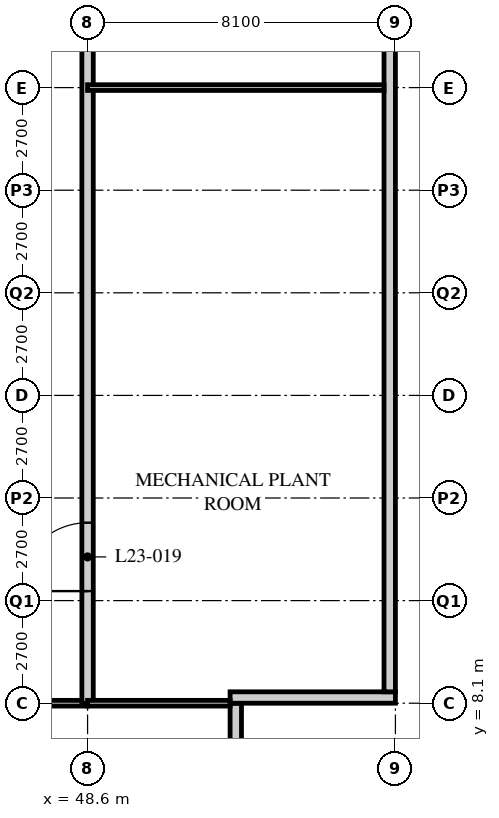
"""IFC4 building model, lengths in metres.
Left out: names, types, materials, properties, quantities, classifications, styles, units other than length and angle.
Written with IfcOpenShell. Run it as: python <this file> out.ifc"""

import sys

from ifc_helpers import new_model, si_unit, direction, frame, frame_2d, origin, place, context, subcontext, project, spatial, rectangle, extrude, element, fill, save


model = new_model("IFC4")
c1 = context("Model", 3, precision=1e-05, world=origin(), true_north=direction((0.0, 1.0)))
c2 = subcontext(c1, "Body", "Model", "MODEL_VIEW")
j1 = project(units=[si_unit("LENGTHUNIT", "METRE"), si_unit("PLANEANGLEUNIT", "RADIAN")], contexts=[c1])
p1 = place(None, origin())
s1 = spatial("IfcSite", under=j1, at=p1, CompositionType="ELEMENT")
p2 = place(p1, origin())
s2 = spatial("IfcBuilding", under=s1, at=p2, CompositionType="ELEMENT")
p3 = place(p2, frame((0.0, 0.0, 90.8)))
s3 = spatial("IfcBuildingStorey", under=s2, at=p3, CompositionType="ELEMENT", Elevation=90.8)
p4 = place(p3, frame((52.5, 4.35, 0.0), z_axis=(0.0, 0.0, 1.0), x_axis=(0.0, 1.0, 0.0)))
e1 = element("IfcWall", 1, at=p4, inside=s3, PredefinedType="SOLIDWALL", context=c2, shape_type="SweptSolid", body=[
    extrude(rectangle(XDim=3.75, YDim=0.3, at=frame_2d((1.875, 0.0))), origin(), (0.0, 0.0, 1.0), 6.25),
])
p5 = place(p3, frame((52.35, 8.25, 0.0), z_axis=(0.0, 0.0, 1.0), x_axis=(1.0, 0.0, 0.0)))
e2 = element("IfcWall", 2, at=p5, inside=s3, PredefinedType="SOLIDWALL", context=c2, shape_type="SweptSolid", body=[
    extrude(rectangle(XDim=4.35, YDim=0.3, at=frame_2d((2.175, 0.0))), origin(), (0.0, 0.0, 1.0), 6.95),
])
p6 = place(p3, frame((56.55, 8.4, 0.0), z_axis=(0.0, 0.0, 1.0), x_axis=(0.0, 1.0, 0.0)))
e3 = element("IfcWall", 3, at=p6, inside=s3, PredefinedType="SOLIDWALL", context=c2, shape_type="SweptSolid", body=[
    extrude(rectangle(XDim=32.1, YDim=0.3, at=frame_2d((16.05, 0.0))), origin(), (0.0, 0.0, 1.0), 5.85),
])
p7 = place(p3, frame((8.1, 8.1, 0.0), z_axis=(0.0, 0.0, 1.0), x_axis=(1.0, 0.0, 0.0)))
e4 = element("IfcWall", 4, at=p7, inside=s3, PredefinedType="PARTITIONING", context=c2, shape_type="SweptSolid", body=[
    extrude(rectangle(XDim=40.5, YDim=0.15, at=frame_2d((20.25, 0.0))), origin(), (0.0, 0.0, 1.0), 6.95),
])
p8 = place(p7, frame((11.25, 0.0, 0.0)))
e5 = element("IfcOpeningElement", 5, at=p8, cuts=e4, PredefinedType="OPENING", context=c2, shape_type="SweptSolid", body=[
    extrude(rectangle(XDim=1.8, YDim=2.4, at=frame_2d((0.9, 1.2))), frame((0.0, 0.085, 0.0), z_axis=(0.0, -1.0, 0.0), x_axis=(1.0, 0.0, 0.0)), (0.0, 0.0, 1.0), 0.17),
])
p9 = place(p7, frame((27.45, 0.0, 0.0)))
e6 = element("IfcOpeningElement", 6, at=p9, cuts=e4, PredefinedType="OPENING", context=c2, shape_type="SweptSolid", body=[
    extrude(rectangle(XDim=1.8, YDim=2.4, at=frame_2d((0.9, 1.2))), frame((0.0, 0.085, 0.0), z_axis=(0.0, -1.0, 0.0), x_axis=(1.0, 0.0, 0.0)), (0.0, 0.0, 1.0), 0.17),
])
p10 = place(p7, frame((1.525, 0.0, 0.0)))
e7 = element("IfcOpeningElement", 7, at=p10, cuts=e4, PredefinedType="OPENING", context=c2, shape_type="SweptSolid", body=[
    extrude(rectangle(XDim=1.0, YDim=2.1, at=frame_2d((0.5, 1.05))), frame((0.0, 0.085, 0.0), z_axis=(0.0, -1.0, 0.0), x_axis=(1.0, 0.0, 0.0)), (0.0, 0.0, 1.0), 0.17),
])
p11 = place(p7, frame((37.975, 0.0, 0.0)))
e8 = element("IfcOpeningElement", 8, at=p11, cuts=e4, PredefinedType="OPENING", context=c2, shape_type="SweptSolid", body=[
    extrude(rectangle(XDim=1.0, YDim=2.1, at=frame_2d((0.5, 1.05))), frame((0.0, 0.085, 0.0), z_axis=(0.0, -1.0, 0.0), x_axis=(1.0, 0.0, 0.0)), (0.0, 0.0, 1.0), 0.17),
])
p12 = place(p3, frame((48.6, 8.1, 0.0), z_axis=(0.0, 0.0, 1.0), x_axis=(0.0, 1.0, 0.0)))
e9 = element("IfcWall", 9, at=p12, inside=s3, PredefinedType="PARTITIONING", context=c2, shape_type="SweptSolid", body=[
    extrude(rectangle(XDim=34.2, YDim=0.3, at=frame_2d((17.1, 0.0))), origin(), (0.0, 0.0, 1.0), 5.85),
])
p13 = place(p12, frame((2.95, 0.0, 0.0)))
e10 = element("IfcOpeningElement", 10, at=p13, cuts=e9, PredefinedType="OPENING", context=c2, shape_type="SweptSolid", body=[
    extrude(rectangle(XDim=1.8, YDim=2.4, at=frame_2d((0.9, 1.2))), frame((0.0, 0.16, 0.0), z_axis=(0.0, -1.0, 0.0), x_axis=(1.0, 0.0, 0.0)), (0.0, 0.0, 1.0), 0.32),
])
p14 = place(p12, frame((27.3, 0.0, 0.0)))
e11 = element("IfcOpeningElement", 11, at=p14, cuts=e9, PredefinedType="OPENING", context=c2, shape_type="SweptSolid", body=[
    extrude(rectangle(XDim=1.8, YDim=2.4, at=frame_2d((0.9, 1.2))), frame((0.0, 0.16, 0.0), z_axis=(0.0, -1.0, 0.0), x_axis=(1.0, 0.0, 0.0)), (0.0, 0.0, 1.0), 0.32),
])
p15 = place(p3, frame((48.6, 24.3, 0.0), z_axis=(0.0, 0.0, 1.0), x_axis=(1.0, 0.0, 0.0)))
e12 = element("IfcWall", 12, at=p15, inside=s3, PredefinedType="PARTITIONING", context=c2, shape_type="SweptSolid", body=[
    extrude(rectangle(XDim=7.8, YDim=0.15, at=frame_2d((3.9, 0.0))), origin(), (0.0, 0.0, 1.0), 5.85),
])
p16 = place(p3, frame((48.6, 8.1, 0.0), z_axis=(0.0, 0.0, 1.0), x_axis=(1.0, 0.0, 0.0)))
e13 = element("IfcWall", 13, at=p16, inside=s3, PredefinedType="PARTITIONING", context=c2, shape_type="SweptSolid", body=[
    extrude(rectangle(XDim=3.75, YDim=0.15, at=frame_2d((1.875, 0.0))), origin(), (0.0, 0.0, 1.0), 6.95),
])
p17 = place(p13, origin())
e14 = element("IfcDoor", 14, at=p17, inside=s3, OperationType="DOUBLE_DOOR_SINGLE_SWING", PredefinedType="DOOR", context=c2, shape_type="SweptSolid", body=[
    extrude(rectangle(XDim=1.8, YDim=2.4, at=frame_2d((0.9, 1.2))), frame((0.0, 0.025, 0.0), z_axis=(0.0, -1.0, 0.0), x_axis=(1.0, 0.0, 0.0)), (0.0, 0.0, 1.0), 0.05),
])
fill(e10, e14)
save(model, sys.argv[1])
